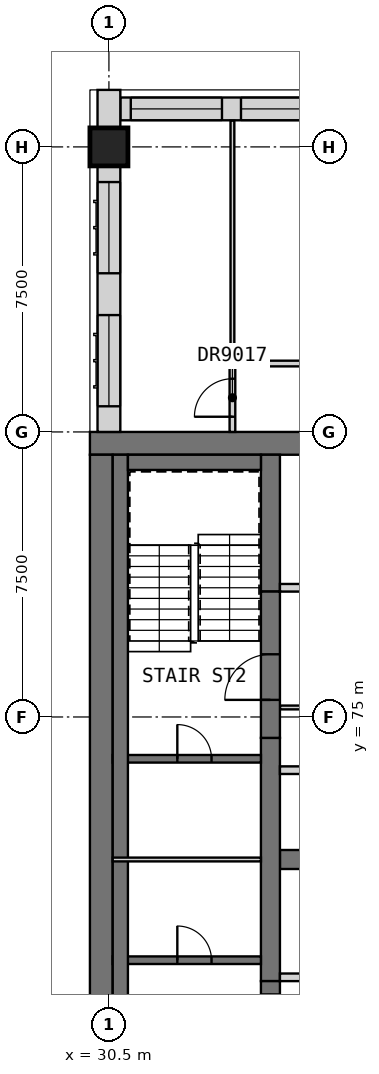
"""IFC4 building model, lengths in metres.
Left out: names, types, materials, properties, quantities, classifications, styles, units other than length and angle.
Written with IfcOpenShell. Run it as: python <this file> out.ifc"""

import sys

from ifc_helpers import new_model, si_unit, direction, frame, frame_2d, origin, origin_2d, place, context, subcontext, project, spatial, rectangle, extrude, element, fill, save


model = new_model("IFC4")
c1 = context("Model", 3, precision=1e-05, world=origin(), true_north=direction((0.0, 1.0)))
c2 = subcontext(c1, "Body", "Model", "MODEL_VIEW")
j1 = project(units=[si_unit("LENGTHUNIT", "METRE"), si_unit("PLANEANGLEUNIT", "RADIAN")], contexts=[c1])
p1 = place(None, origin())
s1 = spatial("IfcSite", under=j1, at=p1, CompositionType="ELEMENT")
p2 = place(p1, origin())
s2 = spatial("IfcBuilding", under=s1, at=p2, CompositionType="ELEMENT")
p3 = place(p2, frame((0.0, 0.0, 269.7)))
s3 = spatial("IfcBuildingStorey", under=s2, at=p3, CompositionType="ELEMENT", Elevation=269.7)
p4 = place(p3, frame((30.5, 90.0, 0.0), z_axis=(0.0, 0.0, 1.0), x_axis=(1.0, 0.0, 0.0)))
e1 = element("IfcColumn", 1, at=p4, inside=s3, PredefinedType="COLUMN", context=c2, shape_type="SweptSolid", body=[
    extrude(rectangle(XDim=1.0, YDim=1.0, at=origin_2d()), origin(), (0.0, 0.0, 1.0), 3.5),
])
p5 = place(p3, frame((30.0, 82.2, 0.0), z_axis=(0.0, 0.0, 1.0), x_axis=(1.0, 0.0, 0.0)))
e2 = element("IfcWall", 2, at=p5, inside=s3, PredefinedType="SHEAR", context=c2, shape_type="SweptSolid", body=[
    extrude(rectangle(XDim=30.0, YDim=0.6, at=frame_2d((15.0, 0.0))), origin(), (0.0, 0.0, 1.0), 3.5),
])
p6 = place(p3, frame((30.3, 60.6, 0.0), z_axis=(0.0, 0.0, 1.0), x_axis=(0.0, 1.0, 0.0)))
e3 = element("IfcWall", 3, at=p6, inside=s3, PredefinedType="SHEAR", context=c2, shape_type="SweptSolid", body=[
    extrude(rectangle(XDim=21.3, YDim=0.6, at=frame_2d((10.65, 0.0))), origin(), (0.0, 0.0, 1.0), 3.5),
])
p7 = place(p3, frame((35.0, 71.25, 0.0), z_axis=(0.0, 0.0, 1.0), x_axis=(1.0, 0.0, 0.0)))
e4 = element("IfcWall", 4, at=p7, inside=s3, PredefinedType="SHEAR", context=c2, shape_type="SweptSolid", body=[
    extrude(rectangle(XDim=15.6, YDim=0.5, at=frame_2d((7.8, 0.0))), origin(), (0.0, 0.0, 1.0), 3.5),
])
p8 = place(p3, frame((34.75, 68.05, 0.0), z_axis=(0.0, 0.0, 1.0), x_axis=(0.0, 1.0, 0.0)))
e5 = element("IfcWall", 5, at=p8, inside=s3, PredefinedType="SHEAR", context=c2, shape_type="SweptSolid", body=[
    extrude(rectangle(XDim=6.4, YDim=0.5, at=frame_2d((3.2, 0.0))), origin(), (0.0, 0.0, 1.0), 3.5),
])
p9 = place(p3, frame((34.75, 78.3, 0.0), z_axis=(0.0, 0.0, 1.0), x_axis=(0.0, 1.0, 0.0)))
e6 = element("IfcWall", 6, at=p9, inside=s3, PredefinedType="SHEAR", context=c2, shape_type="SweptSolid", body=[
    extrude(rectangle(XDim=3.6, YDim=0.5, at=frame_2d((1.8, 0.0))), origin(), (0.0, 0.0, 1.0), 3.5),
])
p10 = place(p2, frame((0.0, 0.0, 34.0)))
s4 = spatial("IfcBuildingStorey", under=s2, at=p10, CompositionType="ELEMENT", Elevation=34.0)
for number, where, z_axis, x_axis in (
    (7, (29.7, 70.8, 0.0), (0.0, 0.0, 1.0), (0.0, 1.0, 0.0)),
    (8, (29.7, 75.675, 0.0), (0.0, 0.0, 1.0), (0.0, 1.0, 0.0)),
    (9, (29.7, 80.55, 0.0), (0.0, 0.0, 1.0), (0.0, 1.0, 0.0)),
):
    element("IfcWall", number, at=place(p10, frame(where, z_axis=z_axis, x_axis=x_axis)), inside=s4, PredefinedType="SOLIDWALL", context=c2, shape_type="SweptSolid", body=[
        extrude(rectangle(XDim=0.9, YDim=0.6, at=frame_2d((0.45, 0.0))), origin(), (0.0, 0.0, 1.0), 286.2),
    ])
p11 = place(p3, frame((36.0, 91.0, 0.0), z_axis=(0.0, 0.0, 1.0), x_axis=(-1.0, 0.0, 0.0)))
e10 = element("IfcWall", 10, at=p11, inside=s3, PredefinedType="SOLIDWALL", context=c2, shape_type="SweptSolid", body=[
    extrude(rectangle(XDim=5.2, YDim=0.6, at=frame_2d((2.6, 0.0))), origin(), (0.0, 0.0, 1.0), 3.25),
])
p12 = place(p11, frame((2.525, 0.0, 0.8)))
e11 = element("IfcOpeningElement", 11, at=p12, cuts=e10, PredefinedType="OPENING", context=c2, shape_type="SweptSolid", body=[
    extrude(rectangle(XDim=2.4, YDim=1.8, at=frame_2d((1.2, 0.9))), frame((0.0, 0.31, 0.0), z_axis=(0.0, -1.0, 0.0), x_axis=(1.0, 0.0, 0.0)), (0.0, 0.0, 1.0), 0.62),
])
p13 = place(p11, frame((0.225, 0.0, 0.8)))
e12 = element("IfcOpeningElement", 12, at=p13, cuts=e10, PredefinedType="OPENING", context=c2, shape_type="SweptSolid", body=[
    extrude(rectangle(XDim=1.8, YDim=1.8, at=frame_2d((0.9, 0.9))), frame((0.0, 0.31, 0.0), z_axis=(0.0, -1.0, 0.0), x_axis=(1.0, 0.0, 0.0)), (0.0, 0.0, 1.0), 0.62),
])
p14 = place(p3, frame((30.5, 91.5, 0.0), z_axis=(0.0, 0.0, 1.0), x_axis=(0.0, -1.0, 0.0)))
e13 = element("IfcWall", 13, at=p14, inside=s3, PredefinedType="SOLIDWALL", context=c2, shape_type="SweptSolid", body=[
    extrude(rectangle(XDim=1.0, YDim=0.6, at=frame_2d((0.5, 0.0))), origin(), (0.0, 0.0, 1.0), 3.25),
])
p15 = place(p3, frame((30.5, 89.5, 0.0), z_axis=(0.0, 0.0, 1.0), x_axis=(0.0, -1.0, 0.0)))
e14 = element("IfcWall", 14, at=p15, inside=s3, PredefinedType="SOLIDWALL", context=c2, shape_type="SweptSolid", body=[
    extrude(rectangle(XDim=7.0, YDim=0.6, at=frame_2d((3.5, 0.0))), origin(), (0.0, 0.0, 1.0), 3.25),
])
p16 = place(p15, frame((3.925, 0.0, 0.8)))
e15 = element("IfcOpeningElement", 15, at=p16, cuts=e14, PredefinedType="OPENING", context=c2, shape_type="SweptSolid", body=[
    extrude(rectangle(XDim=2.4, YDim=1.8, at=frame_2d((1.2, 0.9))), frame((0.0, 0.31, 0.0), z_axis=(0.0, -1.0, 0.0), x_axis=(1.0, 0.0, 0.0)), (0.0, 0.0, 1.0), 0.62),
])
p17 = place(p15, frame((0.425, 0.0, 0.8)))
e16 = element("IfcOpeningElement", 16, at=p17, cuts=e14, PredefinedType="OPENING", context=c2, shape_type="SweptSolid", body=[
    extrude(rectangle(XDim=2.4, YDim=1.8, at=frame_2d((1.2, 0.9))), frame((0.0, 0.31, 0.0), z_axis=(0.0, -1.0, 0.0), x_axis=(1.0, 0.0, 0.0)), (0.0, 0.0, 1.0), 0.62),
])
p18 = place(p3, frame((35.0, 68.15, 0.0), z_axis=(0.0, 0.0, 1.0), x_axis=(1.0, 0.0, 0.0)))
e17 = element("IfcWall", 17, at=p18, inside=s3, PredefinedType="PARTITIONING", context=c2, shape_type="SweptSolid", body=[
    extrude(rectangle(XDim=15.6, YDim=0.2, at=frame_2d((7.8, 0.0))), origin(), (0.0, 0.0, 1.0), 3.25),
])
p19 = place(p18, frame((7.35, 0.0, 0.0)))
e18 = element("IfcOpeningElement", 18, at=p19, cuts=e17, PredefinedType="OPENING", context=c2, shape_type="SweptSolid", body=[
    extrude(rectangle(XDim=0.9, YDim=2.1, at=frame_2d((0.45, 1.05))), frame((0.0, 0.11, 0.0), z_axis=(0.0, -1.0, 0.0), x_axis=(1.0, 0.0, 0.0)), (0.0, 0.0, 1.0), 0.22),
])
p20 = place(p3, frame((35.0, 73.6, 0.0), z_axis=(0.0, 0.0, 1.0), x_axis=(1.0, 0.0, 0.0)))
e19 = element("IfcWall", 19, at=p20, inside=s3, PredefinedType="SOLIDWALL", context=c2, shape_type="SweptSolid", body=[
    extrude(rectangle(XDim=15.6, YDim=0.2, at=frame_2d((7.8, 0.0))), origin(), (0.0, 0.0, 1.0), 3.5),
])
p21 = place(p20, frame((0.75, 0.0, 0.0)))
e20 = element("IfcOpeningElement", 20, at=p21, cuts=e19, PredefinedType="OPENING", context=c2, shape_type="SweptSolid", body=[
    extrude(rectangle(XDim=1.1, YDim=2.1, at=frame_2d((0.55, 1.05))), frame((0.0, 0.11, 0.0), z_axis=(0.0, -1.0, 0.0), x_axis=(1.0, 0.0, 0.0)), (0.0, 0.0, 1.0), 0.22),
])
p22 = place(p20, frame((3.35, 0.0, 0.0)))
e21 = element("IfcOpeningElement", 21, at=p22, cuts=e19, PredefinedType="OPENING", context=c2, shape_type="SweptSolid", body=[
    extrude(rectangle(XDim=1.1, YDim=2.1, at=frame_2d((0.55, 1.05))), frame((0.0, 0.11, 0.0), z_axis=(0.0, -1.0, 0.0), x_axis=(1.0, 0.0, 0.0)), (0.0, 0.0, 1.0), 0.22),
])
p23 = place(p20, frame((5.95, 0.0, 0.0)))
e22 = element("IfcOpeningElement", 22, at=p23, cuts=e19, PredefinedType="OPENING", context=c2, shape_type="SweptSolid", body=[
    extrude(rectangle(XDim=1.1, YDim=2.1, at=frame_2d((0.55, 1.05))), frame((0.0, 0.11, 0.0), z_axis=(0.0, -1.0, 0.0), x_axis=(1.0, 0.0, 0.0)), (0.0, 0.0, 1.0), 0.22),
])
p24 = place(p20, frame((8.55, 0.0, 0.0)))
e23 = element("IfcOpeningElement", 23, at=p24, cuts=e19, PredefinedType="OPENING", context=c2, shape_type="SweptSolid", body=[
    extrude(rectangle(XDim=1.1, YDim=2.1, at=frame_2d((0.55, 1.05))), frame((0.0, 0.11, 0.0), z_axis=(0.0, -1.0, 0.0), x_axis=(1.0, 0.0, 0.0)), (0.0, 0.0, 1.0), 0.22),
])
p25 = place(p20, frame((11.15, 0.0, 0.0)))
e24 = element("IfcOpeningElement", 24, at=p25, cuts=e19, PredefinedType="OPENING", context=c2, shape_type="SweptSolid", body=[
    extrude(rectangle(XDim=1.1, YDim=2.1, at=frame_2d((0.55, 1.05))), frame((0.0, 0.11, 0.0), z_axis=(0.0, -1.0, 0.0), x_axis=(1.0, 0.0, 0.0)), (0.0, 0.0, 1.0), 0.22),
])
p26 = place(p20, frame((13.75, 0.0, 0.0)))
e25 = element("IfcOpeningElement", 25, at=p26, cuts=e19, PredefinedType="OPENING", context=c2, shape_type="SweptSolid", body=[
    extrude(rectangle(XDim=1.1, YDim=2.1, at=frame_2d((0.55, 1.05))), frame((0.0, 0.11, 0.0), z_axis=(0.0, -1.0, 0.0), x_axis=(1.0, 0.0, 0.0)), (0.0, 0.0, 1.0), 0.22),
])
p27 = place(p3, frame((35.0, 78.4, 0.0), z_axis=(0.0, 0.0, 1.0), x_axis=(1.0, 0.0, 0.0)))
e26 = element("IfcWall", 26, at=p27, inside=s3, PredefinedType="SOLIDWALL", context=c2, shape_type="SweptSolid", body=[
    extrude(rectangle(XDim=15.6, YDim=0.2, at=frame_2d((7.8, 0.0))), origin(), (0.0, 0.0, 1.0), 3.5),
])
p28 = place(p27, frame((0.75, 0.0, 0.0)))
e27 = element("IfcOpeningElement", 27, at=p28, cuts=e26, PredefinedType="OPENING", context=c2, shape_type="SweptSolid", body=[
    extrude(rectangle(XDim=1.1, YDim=2.1, at=frame_2d((0.55, 1.05))), frame((0.0, 0.11, 0.0), z_axis=(0.0, -1.0, 0.0), x_axis=(1.0, 0.0, 0.0)), (0.0, 0.0, 1.0), 0.22),
])
p29 = place(p27, frame((3.35, 0.0, 0.0)))
e28 = element("IfcOpeningElement", 28, at=p29, cuts=e26, PredefinedType="OPENING", context=c2, shape_type="SweptSolid", body=[
    extrude(rectangle(XDim=1.1, YDim=2.1, at=frame_2d((0.55, 1.05))), frame((0.0, 0.11, 0.0), z_axis=(0.0, -1.0, 0.0), x_axis=(1.0, 0.0, 0.0)), (0.0, 0.0, 1.0), 0.22),
])
p30 = place(p27, frame((11.15, 0.0, 0.0)))
e29 = element("IfcOpeningElement", 29, at=p30, cuts=e26, PredefinedType="OPENING", context=c2, shape_type="SweptSolid", body=[
    extrude(rectangle(XDim=1.1, YDim=2.1, at=frame_2d((0.55, 1.05))), frame((0.0, 0.11, 0.0), z_axis=(0.0, -1.0, 0.0), x_axis=(1.0, 0.0, 0.0)), (0.0, 0.0, 1.0), 0.22),
])
p31 = place(p27, frame((13.75, 0.0, 0.0)))
e30 = element("IfcOpeningElement", 30, at=p31, cuts=e26, PredefinedType="OPENING", context=c2, shape_type="SweptSolid", body=[
    extrude(rectangle(XDim=1.1, YDim=2.1, at=frame_2d((0.55, 1.05))), frame((0.0, 0.11, 0.0), z_axis=(0.0, -1.0, 0.0), x_axis=(1.0, 0.0, 0.0)), (0.0, 0.0, 1.0), 0.22),
])
p32 = place(p3, frame((35.0, 75.25, 0.0), z_axis=(0.0, 0.0, 1.0), x_axis=(1.0, 0.0, 0.0)))
e31 = element("IfcWall", 31, at=p32, inside=s3, PredefinedType="PARTITIONING", context=c2, shape_type="SweptSolid", body=[
    extrude(rectangle(XDim=5.25, YDim=0.1, at=frame_2d((2.625, 0.0))), origin(), (0.0, 0.0, 1.0), 3.25),
])
p33 = place(p3, frame((34.75, 64.2, 0.0), z_axis=(0.0, 0.0, 1.0), x_axis=(0.0, 1.0, 0.0)))
e32 = element("IfcWall", 32, at=p33, inside=s3, PredefinedType="SOLIDWALL", context=c2, shape_type="SweptSolid", body=[
    extrude(rectangle(XDim=3.85, YDim=0.5, at=frame_2d((1.925, 0.0))), origin(), (0.0, 0.0, 1.0), 2.3),
])
p34 = place(p33, frame((2.3, 0.0, 0.0)))
e33 = element("IfcOpeningElement", 33, at=p34, cuts=e32, PredefinedType="OPENING", context=c2, shape_type="SweptSolid", body=[
    extrude(rectangle(XDim=1.2, YDim=2.1, at=frame_2d((0.6, 1.05))), frame((0.0, 0.26, 0.0), z_axis=(0.0, -1.0, 0.0), x_axis=(1.0, 0.0, 0.0)), (0.0, 0.0, 1.0), 0.52),
])
p35 = place(p3, frame((34.75, 74.45, 0.0), z_axis=(0.0, 0.0, 1.0), x_axis=(0.0, 1.0, 0.0)))
e34 = element("IfcWall", 34, at=p35, inside=s3, PredefinedType="SOLIDWALL", context=c2, shape_type="SweptSolid", body=[
    extrude(rectangle(XDim=3.85, YDim=0.5, at=frame_2d((1.925, 0.0))), origin(), (0.0, 0.0, 1.0), 2.3),
])
p36 = place(p35, frame((1.0, 0.0, 0.0)))
e35 = element("IfcOpeningElement", 35, at=p36, cuts=e34, PredefinedType="OPENING", context=c2, shape_type="SweptSolid", body=[
    extrude(rectangle(XDim=1.2, YDim=2.1, at=frame_2d((0.6, 1.05))), frame((0.0, 0.26, 0.0), z_axis=(0.0, -1.0, 0.0), x_axis=(1.0, 0.0, 0.0)), (0.0, 0.0, 1.0), 0.52),
])
p37 = place(p3, frame((30.6, 68.6, 0.0), z_axis=(0.0, 0.0, 1.0), x_axis=(1.0, 0.0, 0.0)))
e36 = element("IfcWall", 36, at=p37, inside=s3, PredefinedType="SOLIDWALL", context=c2, shape_type="SweptSolid", body=[
    extrude(rectangle(XDim=3.9, YDim=0.2, at=frame_2d((1.95, 0.0))), origin(), (0.0, 0.0, 1.0), 3.25),
])
p38 = place(p37, frame((1.7, 0.0, 0.0)))
e37 = element("IfcOpeningElement", 37, at=p38, cuts=e36, PredefinedType="OPENING", context=c2, shape_type="SweptSolid", body=[
    extrude(rectangle(XDim=0.9, YDim=2.1, at=frame_2d((0.45, 1.05))), frame((0.0, 0.11, 0.0), z_axis=(0.0, -1.0, 0.0), x_axis=(1.0, 0.0, 0.0)), (0.0, 0.0, 1.0), 0.22),
])
p39 = place(p3, frame((30.6, 73.9, 0.0), z_axis=(0.0, 0.0, 1.0), x_axis=(1.0, 0.0, 0.0)))
e38 = element("IfcWall", 38, at=p39, inside=s3, PredefinedType="SOLIDWALL", context=c2, shape_type="SweptSolid", body=[
    extrude(rectangle(XDim=3.9, YDim=0.2, at=frame_2d((1.95, 0.0))), origin(), (0.0, 0.0, 1.0), 3.25),
])
p40 = place(p39, frame((1.7, 0.0, 0.0)))
e39 = element("IfcOpeningElement", 39, at=p40, cuts=e38, PredefinedType="OPENING", context=c2, shape_type="SweptSolid", body=[
    extrude(rectangle(XDim=0.9, YDim=2.1, at=frame_2d((0.45, 1.05))), frame((0.0, 0.11, 0.0), z_axis=(0.0, -1.0, 0.0), x_axis=(1.0, 0.0, 0.0)), (0.0, 0.0, 1.0), 0.22),
])
p41 = place(p3, frame((30.8, 60.6, 0.0), z_axis=(0.0, 0.0, 1.0), x_axis=(0.0, 1.0, 0.0)))
e40 = element("IfcWall", 40, at=p41, inside=s3, PredefinedType="SOLIDWALL", context=c2, shape_type="SweptSolid", body=[
    extrude(rectangle(XDim=21.3, YDim=0.4, at=frame_2d((10.65, 0.0))), origin(), (0.0, 0.0, 1.0), 3.25),
])
p42 = place(p3, frame((31.0, 81.7, 0.0), z_axis=(0.0, 0.0, 1.0), x_axis=(1.0, 0.0, 0.0)))
e41 = element("IfcWall", 41, at=p42, inside=s3, PredefinedType="SOLIDWALL", context=c2, shape_type="SweptSolid", body=[
    extrude(rectangle(XDim=3.5, YDim=0.4, at=frame_2d((1.75, 0.0))), origin(), (0.0, 0.0, 1.0), 3.25),
])
p43 = place(p3, frame((30.6, 71.25, 0.0), z_axis=(0.0, 0.0, 1.0), x_axis=(1.0, 0.0, 0.0)))
e42 = element("IfcWall", 42, at=p43, inside=s3, PredefinedType="PARTITIONING", context=c2, shape_type="SweptSolid", body=[
    extrude(rectangle(XDim=3.9, YDim=0.1, at=frame_2d((1.95, 0.0))), origin(), (0.0, 0.0, 1.0), 3.25),
])
p44 = place(p3, frame((33.75, 84.3, 0.0), z_axis=(0.0, 0.0, 1.0), x_axis=(1.0, 0.0, 0.0)))
e43 = element("IfcWall", 43, at=p44, inside=s3, PredefinedType="PARTITIONING", context=c2, shape_type="SweptSolid", body=[
    extrude(rectangle(XDim=28.05, YDim=0.15, at=frame_2d((14.025, 0.0))), origin(), (0.0, 0.0, 1.0), 3.25),
])
p45 = place(p44, frame((5.125, 0.0, 0.0)))
e44 = element("IfcOpeningElement", 44, at=p45, cuts=e43, PredefinedType="OPENING", context=c2, shape_type="SweptSolid", body=[
    extrude(rectangle(XDim=1.0, YDim=2.1, at=frame_2d((0.5, 1.05))), frame((0.0, 0.085, 0.0), z_axis=(0.0, -1.0, 0.0), x_axis=(1.0, 0.0, 0.0)), (0.0, 0.0, 1.0), 0.17),
])
p46 = place(p44, frame((12.675, 0.0, 0.0)))
e45 = element("IfcOpeningElement", 45, at=p46, cuts=e43, PredefinedType="OPENING", context=c2, shape_type="SweptSolid", body=[
    extrude(rectangle(XDim=0.9, YDim=2.1, at=frame_2d((0.45, 1.05))), frame((0.0, 0.085, 0.0), z_axis=(0.0, -1.0, 0.0), x_axis=(1.0, 0.0, 0.0)), (0.0, 0.0, 1.0), 0.17),
])
p47 = place(p44, frame((26.65, 0.0, 0.0)))
e46 = element("IfcOpeningElement", 46, at=p47, cuts=e43, PredefinedType="OPENING", context=c2, shape_type="SweptSolid", body=[
    extrude(rectangle(XDim=1.0, YDim=2.1, at=frame_2d((0.5, 1.05))), frame((0.0, 0.085, 0.0), z_axis=(0.0, -1.0, 0.0), x_axis=(1.0, 0.0, 0.0)), (0.0, 0.0, 1.0), 0.17),
])
p48 = place(p3, frame((33.75, 82.5, 0.0), z_axis=(0.0, 0.0, 1.0), x_axis=(0.0, 1.0, 0.0)))
e47 = element("IfcWall", 47, at=p48, inside=s3, PredefinedType="PARTITIONING", context=c2, shape_type="SweptSolid", body=[
    extrude(rectangle(XDim=1.725, YDim=0.15, at=frame_2d((0.863, 0.0))), origin(), (0.0, 0.0, 1.0), 3.25),
])
p49 = place(p48, frame((0.4, 0.0, 0.0)))
e48 = element("IfcOpeningElement", 48, at=p49, cuts=e47, PredefinedType="OPENING", context=c2, shape_type="SweptSolid", body=[
    extrude(rectangle(XDim=1.0, YDim=2.1, at=frame_2d((0.5, 1.05))), frame((0.0, 0.085, 0.0), z_axis=(0.0, -1.0, 0.0), x_axis=(1.0, 0.0, 0.0)), (0.0, 0.0, 1.0), 0.17),
])
p50 = place(p3, frame((33.75, 84.375, 0.0), z_axis=(0.0, 0.0, 1.0), x_axis=(0.0, 1.0, 0.0)))
e49 = element("IfcWall", 49, at=p50, inside=s3, PredefinedType="PARTITIONING", context=c2, shape_type="SweptSolid", body=[
    extrude(rectangle(XDim=6.315, YDim=0.1, at=frame_2d((3.157, 0.0))), origin(), (0.0, 0.0, 1.0), 3.25),
])
p51 = place(p12, origin())
e50 = element("IfcWindow", 50, at=p51, inside=s3, PartitioningType="SINGLE_PANEL", PredefinedType="WINDOW", context=c2, shape_type="SweptSolid", body=[
    extrude(rectangle(XDim=2.4, YDim=1.8, at=frame_2d((1.2, 0.9))), frame((0.0, -0.07, 0.0), z_axis=(0.0, -1.0, 0.0), x_axis=(1.0, 0.0, 0.0)), (0.0, 0.0, 1.0), 0.06),
])
fill(e11, e50)
p52 = place(p13, origin())
e51 = element("IfcWindow", 51, at=p52, inside=s3, PartitioningType="SINGLE_PANEL", PredefinedType="WINDOW", context=c2, shape_type="SweptSolid", body=[
    extrude(rectangle(XDim=1.8, YDim=1.8, at=frame_2d((0.9, 0.9))), frame((0.0, -0.07, 0.0), z_axis=(0.0, -1.0, 0.0), x_axis=(1.0, 0.0, 0.0)), (0.0, 0.0, 1.0), 0.06),
])
fill(e12, e51)
p53 = place(p16, origin())
e52 = element("IfcWindow", 52, at=p53, inside=s3, PartitioningType="SINGLE_PANEL", PredefinedType="WINDOW", context=c2, shape_type="SweptSolid", body=[
    extrude(rectangle(XDim=2.4, YDim=1.8, at=frame_2d((1.2, 0.9))), frame((0.0, -0.07, 0.0), z_axis=(0.0, -1.0, 0.0), x_axis=(1.0, 0.0, 0.0)), (0.0, 0.0, 1.0), 0.06),
])
fill(e15, e52)
p54 = place(p17, origin())
e53 = element("IfcWindow", 53, at=p54, inside=s3, PartitioningType="SINGLE_PANEL", PredefinedType="WINDOW", context=c2, shape_type="SweptSolid", body=[
    extrude(rectangle(XDim=2.4, YDim=1.8, at=frame_2d((1.2, 0.9))), frame((0.0, -0.07, 0.0), z_axis=(0.0, -1.0, 0.0), x_axis=(1.0, 0.0, 0.0)), (0.0, 0.0, 1.0), 0.06),
])
fill(e16, e53)
p55 = place(p34, origin())
e54 = element("IfcDoor", 54, at=p55, inside=s3, OperationType="SINGLE_SWING_LEFT", PredefinedType="DOOR", context=c2, shape_type="SweptSolid", body=[
    extrude(rectangle(XDim=1.2, YDim=2.1, at=frame_2d((0.6, 1.05))), frame((0.0, 0.025, 0.0), z_axis=(0.0, -1.0, 0.0), x_axis=(1.0, 0.0, 0.0)), (0.0, 0.0, 1.0), 0.05),
])
fill(e33, e54)
p56 = place(p36, origin())
e55 = element("IfcDoor", 55, at=p56, inside=s3, OperationType="SINGLE_SWING_RIGHT", PredefinedType="DOOR", context=c2, shape_type="SweptSolid", body=[
    extrude(rectangle(XDim=1.2, YDim=2.1, at=frame_2d((0.6, 1.05))), frame((0.0, 0.025, 0.0), z_axis=(0.0, -1.0, 0.0), x_axis=(1.0, 0.0, 0.0)), (0.0, 0.0, 1.0), 0.05),
])
fill(e35, e55)
p57 = place(p38, origin())
e56 = element("IfcDoor", 56, at=p57, inside=s3, OperationType="SINGLE_SWING_LEFT", PredefinedType="DOOR", context=c2, shape_type="SweptSolid", body=[
    extrude(rectangle(XDim=0.9, YDim=2.1, at=frame_2d((0.45, 1.05))), frame((0.0, 0.025, 0.0), z_axis=(0.0, -1.0, 0.0), x_axis=(1.0, 0.0, 0.0)), (0.0, 0.0, 1.0), 0.05),
])
fill(e37, e56)
p58 = place(p40, origin())
e57 = element("IfcDoor", 57, at=p58, inside=s3, OperationType="SINGLE_SWING_RIGHT", PredefinedType="DOOR", context=c2, shape_type="SweptSolid", body=[
    extrude(rectangle(XDim=0.9, YDim=2.1, at=frame_2d((0.45, 1.05))), frame((0.0, 0.025, 0.0), z_axis=(0.0, -1.0, 0.0), x_axis=(1.0, 0.0, 0.0)), (0.0, 0.0, 1.0), 0.05),
])
fill(e39, e57)
p59 = place(p49, origin())
e58 = element("IfcDoor", 58, at=p59, inside=s3, OperationType="SINGLE_SWING_LEFT", PredefinedType="DOOR", context=c2, shape_type="SweptSolid", body=[
    extrude(rectangle(XDim=1.0, YDim=2.1, at=frame_2d((0.5, 1.05))), frame((0.0, 0.025, 0.0), z_axis=(0.0, -1.0, 0.0), x_axis=(1.0, 0.0, 0.0)), (0.0, 0.0, 1.0), 0.05),
])
fill(e48, e58)
save(model, sys.argv[1])
